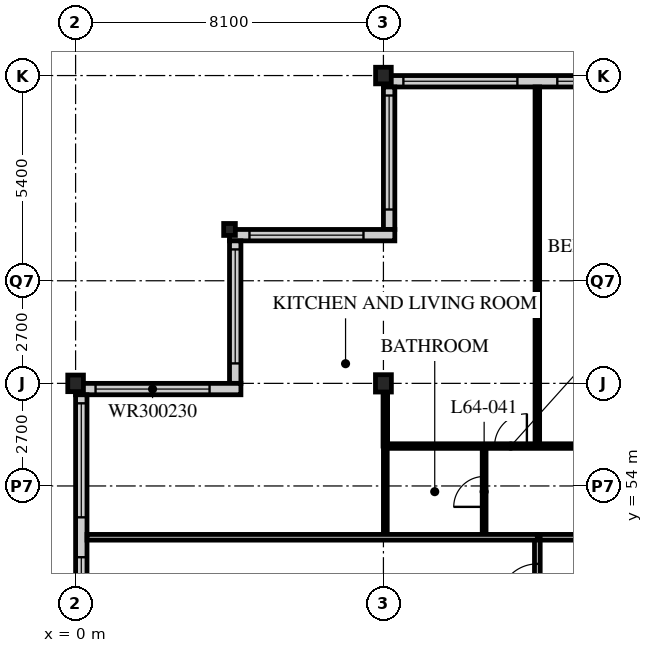
"""IFC4 building model, lengths in metres.
Left out: names, types, materials, properties, quantities, classifications, styles, units other than length and angle.
Written with IfcOpenShell. Run it as: python <this file> out.ifc"""

import sys

from ifc_helpers import new_model, si_unit, direction, frame, frame_2d, origin, origin_2d, place, context, subcontext, project, spatial, rectangle, i_section, extrude, element, fill, save


model = new_model("IFC4")
c1 = context("Model", 3, precision=1e-05, world=origin(), true_north=direction((0.0, 1.0)))
c2 = subcontext(c1, "Body", "Model", "MODEL_VIEW")
j1 = project(units=[si_unit("LENGTHUNIT", "METRE"), si_unit("PLANEANGLEUNIT", "RADIAN")], contexts=[c1])
p1 = place(None, origin())
s1 = spatial("IfcSite", under=j1, at=p1, CompositionType="ELEMENT")
p2 = place(p1, origin())
s2 = spatial("IfcBuilding", under=s1, at=p2, CompositionType="ELEMENT")
p3 = place(p2, frame((0.0, 0.0, 250.2)))
s3 = spatial("IfcBuildingStorey", under=s2, at=p3, CompositionType="ELEMENT", Elevation=250.2)
p4 = place(p3, frame((0.0, 56.7, 0.0), z_axis=(0.0, 0.0, 1.0), x_axis=(1.0, 0.0, 0.0)))
e1 = element("IfcColumn", 1, at=p4, inside=s3, PredefinedType="COLUMN", context=c2, shape_type="SweptSolid", body=[
    extrude(i_section(OverallWidth=0.412, OverallDepth=0.437, WebThickness=0.036, FlangeThickness=0.058, FilletRadius=0.015, at=origin_2d()), origin(), (0.0, 0.0, 1.0), 3.9),
])
p5 = place(p3, frame((4.05, 60.75, 0.0), z_axis=(0.0, 0.0, 1.0), x_axis=(1.0, 0.0, 0.0)))
e2 = element("IfcColumn", 2, at=p5, inside=s3, PredefinedType="COLUMN", context=c2, shape_type="SweptSolid", body=[
    extrude(i_section(OverallWidth=0.307, OverallDepth=0.314, WebThickness=0.012, FlangeThickness=0.019, FilletRadius=0.015, at=origin_2d()), origin(), (0.0, 0.0, 1.0), 3.9),
])
p6 = place(p3, frame((8.1, 56.7, 0.0), z_axis=(0.0, 0.0, 1.0), x_axis=(1.0, 0.0, 0.0)))
e3 = element("IfcColumn", 3, at=p6, inside=s3, PredefinedType="COLUMN", context=c2, shape_type="SweptSolid", body=[
    extrude(i_section(OverallWidth=0.418, OverallDepth=0.456, WebThickness=0.042, FlangeThickness=0.067, FilletRadius=0.015, at=origin_2d()), origin(), (0.0, 0.0, 1.0), 3.9),
])
p7 = place(p3, frame((8.1, 64.8, 0.0), z_axis=(0.0, 0.0, 1.0), x_axis=(1.0, 0.0, 0.0)))
e4 = element("IfcColumn", 4, at=p7, inside=s3, PredefinedType="COLUMN", context=c2, shape_type="SweptSolid", body=[
    extrude(i_section(OverallWidth=0.412, OverallDepth=0.437, WebThickness=0.036, FlangeThickness=0.058, FilletRadius=0.015, at=origin_2d()), origin(), (0.0, 0.0, 1.0), 3.9),
])
p8 = place(p3, frame((48.3, 64.65, 0.0), z_axis=(0.0, 0.0, 1.0), x_axis=(-1.0, 0.0, 0.0)))
e5 = element("IfcWall", 5, at=p8, inside=s3, PredefinedType="SOLIDWALL", context=c2, shape_type="SweptSolid", body=[
    extrude(rectangle(XDim=40.2, YDim=0.3, at=frame_2d((20.1, 0.0))), origin(), (0.0, 0.0, 1.0), 3.69),
])
p9 = place(p8, frame((0.225, 0.0, 0.6)))
e6 = element("IfcOpeningElement", 6, at=p9, cuts=e5, PredefinedType="OPENING", context=c2, shape_type="SweptSolid", body=[
    extrude(rectangle(XDim=3.0, YDim=2.4, at=frame_2d((1.5, 1.2))), frame((0.0, 0.16, 0.0), z_axis=(0.0, -1.0, 0.0), x_axis=(1.0, 0.0, 0.0)), (0.0, 0.0, 1.0), 0.32),
])
p10 = place(p8, frame((4.275, 0.0, 0.6)))
e7 = element("IfcOpeningElement", 7, at=p10, cuts=e5, PredefinedType="OPENING", context=c2, shape_type="SweptSolid", body=[
    extrude(rectangle(XDim=3.0, YDim=2.4, at=frame_2d((1.5, 1.2))), frame((0.0, 0.16, 0.0), z_axis=(0.0, -1.0, 0.0), x_axis=(1.0, 0.0, 0.0)), (0.0, 0.0, 1.0), 0.32),
])
p11 = place(p8, frame((8.325, 0.0, 0.6)))
e8 = element("IfcOpeningElement", 8, at=p11, cuts=e5, PredefinedType="OPENING", context=c2, shape_type="SweptSolid", body=[
    extrude(rectangle(XDim=3.0, YDim=2.4, at=frame_2d((1.5, 1.2))), frame((0.0, 0.16, 0.0), z_axis=(0.0, -1.0, 0.0), x_axis=(1.0, 0.0, 0.0)), (0.0, 0.0, 1.0), 0.32),
])
p12 = place(p8, frame((12.375, 0.0, 0.6)))
e9 = element("IfcOpeningElement", 9, at=p12, cuts=e5, PredefinedType="OPENING", context=c2, shape_type="SweptSolid", body=[
    extrude(rectangle(XDim=3.0, YDim=2.4, at=frame_2d((1.5, 1.2))), frame((0.0, 0.16, 0.0), z_axis=(0.0, -1.0, 0.0), x_axis=(1.0, 0.0, 0.0)), (0.0, 0.0, 1.0), 0.32),
])
p13 = place(p8, frame((16.425, 0.0, 0.6)))
e10 = element("IfcOpeningElement", 10, at=p13, cuts=e5, PredefinedType="OPENING", context=c2, shape_type="SweptSolid", body=[
    extrude(rectangle(XDim=3.0, YDim=2.4, at=frame_2d((1.5, 1.2))), frame((0.0, 0.16, 0.0), z_axis=(0.0, -1.0, 0.0), x_axis=(1.0, 0.0, 0.0)), (0.0, 0.0, 1.0), 0.32),
])
p14 = place(p8, frame((20.475, 0.0, 0.6)))
e11 = element("IfcOpeningElement", 11, at=p14, cuts=e5, PredefinedType="OPENING", context=c2, shape_type="SweptSolid", body=[
    extrude(rectangle(XDim=3.0, YDim=2.4, at=frame_2d((1.5, 1.2))), frame((0.0, 0.16, 0.0), z_axis=(0.0, -1.0, 0.0), x_axis=(1.0, 0.0, 0.0)), (0.0, 0.0, 1.0), 0.32),
])
p15 = place(p8, frame((24.525, 0.0, 0.6)))
e12 = element("IfcOpeningElement", 12, at=p15, cuts=e5, PredefinedType="OPENING", context=c2, shape_type="SweptSolid", body=[
    extrude(rectangle(XDim=3.0, YDim=2.4, at=frame_2d((1.5, 1.2))), frame((0.0, 0.16, 0.0), z_axis=(0.0, -1.0, 0.0), x_axis=(1.0, 0.0, 0.0)), (0.0, 0.0, 1.0), 0.32),
])
p16 = place(p8, frame((28.575, 0.0, 0.6)))
e13 = element("IfcOpeningElement", 13, at=p16, cuts=e5, PredefinedType="OPENING", context=c2, shape_type="SweptSolid", body=[
    extrude(rectangle(XDim=3.0, YDim=2.4, at=frame_2d((1.5, 1.2))), frame((0.0, 0.16, 0.0), z_axis=(0.0, -1.0, 0.0), x_axis=(1.0, 0.0, 0.0)), (0.0, 0.0, 1.0), 0.32),
])
p17 = place(p8, frame((32.625, 0.0, 0.6)))
e14 = element("IfcOpeningElement", 14, at=p17, cuts=e5, PredefinedType="OPENING", context=c2, shape_type="SweptSolid", body=[
    extrude(rectangle(XDim=3.0, YDim=2.4, at=frame_2d((1.5, 1.2))), frame((0.0, 0.16, 0.0), z_axis=(0.0, -1.0, 0.0), x_axis=(1.0, 0.0, 0.0)), (0.0, 0.0, 1.0), 0.32),
])
p18 = place(p8, frame((36.675, 0.0, 0.6)))
e15 = element("IfcOpeningElement", 15, at=p18, cuts=e5, PredefinedType="OPENING", context=c2, shape_type="SweptSolid", body=[
    extrude(rectangle(XDim=3.0, YDim=2.4, at=frame_2d((1.5, 1.2))), frame((0.0, 0.16, 0.0), z_axis=(0.0, -1.0, 0.0), x_axis=(1.0, 0.0, 0.0)), (0.0, 0.0, 1.0), 0.32),
])
p19 = place(p3, frame((8.25, 64.5, 0.0), z_axis=(0.0, 0.0, 1.0), x_axis=(0.0, -1.0, 0.0)))
e16 = element("IfcWall", 16, at=p19, inside=s3, PredefinedType="SOLIDWALL", context=c2, shape_type="SweptSolid", body=[
    extrude(rectangle(XDim=3.75, YDim=0.3, at=frame_2d((1.875, 0.0))), origin(), (0.0, 0.0, 1.0), 3.69),
])
p20 = place(p19, frame((0.225, 0.0, 0.6)))
e17 = element("IfcOpeningElement", 17, at=p20, cuts=e16, PredefinedType="OPENING", context=c2, shape_type="SweptSolid", body=[
    extrude(rectangle(XDim=3.0, YDim=2.3, at=frame_2d((1.5, 1.15))), frame((0.0, 0.16, 0.0), z_axis=(0.0, -1.0, 0.0), x_axis=(1.0, 0.0, 0.0)), (0.0, 0.0, 1.0), 0.32),
])
p21 = place(p3, frame((8.4, 60.6, 0.0), z_axis=(0.0, 0.0, 1.0), x_axis=(-1.0, 0.0, 0.0)))
e18 = element("IfcWall", 18, at=p21, inside=s3, PredefinedType="SOLIDWALL", context=c2, shape_type="SweptSolid", body=[
    extrude(rectangle(XDim=4.35, YDim=0.3, at=frame_2d((2.175, 0.0))), origin(), (0.0, 0.0, 1.0), 3.69),
])
p22 = place(p21, frame((0.825, 0.0, 0.6)))
e19 = element("IfcOpeningElement", 19, at=p22, cuts=e18, PredefinedType="OPENING", context=c2, shape_type="SweptSolid", body=[
    extrude(rectangle(XDim=3.0, YDim=2.3, at=frame_2d((1.5, 1.15))), frame((0.0, 0.16, 0.0), z_axis=(0.0, -1.0, 0.0), x_axis=(1.0, 0.0, 0.0)), (0.0, 0.0, 1.0), 0.32),
])
p23 = place(p3, frame((4.2, 60.45, 0.0), z_axis=(0.0, 0.0, 1.0), x_axis=(0.0, -1.0, 0.0)))
e20 = element("IfcWall", 20, at=p23, inside=s3, PredefinedType="SOLIDWALL", context=c2, shape_type="SweptSolid", body=[
    extrude(rectangle(XDim=3.75, YDim=0.3, at=frame_2d((1.875, 0.0))), origin(), (0.0, 0.0, 1.0), 3.69),
])
p24 = place(p23, frame((0.225, 0.0, 0.6)))
e21 = element("IfcOpeningElement", 21, at=p24, cuts=e20, PredefinedType="OPENING", context=c2, shape_type="SweptSolid", body=[
    extrude(rectangle(XDim=3.0, YDim=2.3, at=frame_2d((1.5, 1.15))), frame((0.0, 0.16, 0.0), z_axis=(0.0, -1.0, 0.0), x_axis=(1.0, 0.0, 0.0)), (0.0, 0.0, 1.0), 0.32),
])
p25 = place(p3, frame((4.35, 56.55, 0.0), z_axis=(0.0, 0.0, 1.0), x_axis=(-1.0, 0.0, 0.0)))
e22 = element("IfcWall", 22, at=p25, inside=s3, PredefinedType="SOLIDWALL", context=c2, shape_type="SweptSolid", body=[
    extrude(rectangle(XDim=4.35, YDim=0.3, at=frame_2d((2.175, 0.0))), origin(), (0.0, 0.0, 1.0), 3.69),
])
p26 = place(p25, frame((0.825, 0.0, 0.6)))
e23 = element("IfcOpeningElement", 23, at=p26, cuts=e22, PredefinedType="OPENING", context=c2, shape_type="SweptSolid", body=[
    extrude(rectangle(XDim=3.0, YDim=2.3, at=frame_2d((1.5, 1.15))), frame((0.0, 0.16, 0.0), z_axis=(0.0, -1.0, 0.0), x_axis=(1.0, 0.0, 0.0)), (0.0, 0.0, 1.0), 0.32),
])
p27 = place(p3, frame((0.15, 56.4, 0.0), z_axis=(0.0, 0.0, 1.0), x_axis=(0.0, -1.0, 0.0)))
e24 = element("IfcWall", 24, at=p27, inside=s3, PredefinedType="SOLIDWALL", context=c2, shape_type="SweptSolid", body=[
    extrude(rectangle(XDim=32.1, YDim=0.3, at=frame_2d((16.05, 0.0))), origin(), (0.0, 0.0, 1.0), 3.69),
])
p28 = place(p27, frame((0.225, 0.0, 0.6)))
e25 = element("IfcOpeningElement", 25, at=p28, cuts=e24, PredefinedType="OPENING", context=c2, shape_type="SweptSolid", body=[
    extrude(rectangle(XDim=3.0, YDim=2.4, at=frame_2d((1.5, 1.2))), frame((0.0, 0.16, 0.0), z_axis=(0.0, -1.0, 0.0), x_axis=(1.0, 0.0, 0.0)), (0.0, 0.0, 1.0), 0.32),
])
p29 = place(p27, frame((4.275, 0.0, 0.6)))
e26 = element("IfcOpeningElement", 26, at=p29, cuts=e24, PredefinedType="OPENING", context=c2, shape_type="SweptSolid", body=[
    extrude(rectangle(XDim=3.0, YDim=2.4, at=frame_2d((1.5, 1.2))), frame((0.0, 0.16, 0.0), z_axis=(0.0, -1.0, 0.0), x_axis=(1.0, 0.0, 0.0)), (0.0, 0.0, 1.0), 0.32),
])
p30 = place(p27, frame((8.325, 0.0, 0.6)))
e27 = element("IfcOpeningElement", 27, at=p30, cuts=e24, PredefinedType="OPENING", context=c2, shape_type="SweptSolid", body=[
    extrude(rectangle(XDim=3.0, YDim=2.4, at=frame_2d((1.5, 1.2))), frame((0.0, 0.16, 0.0), z_axis=(0.0, -1.0, 0.0), x_axis=(1.0, 0.0, 0.0)), (0.0, 0.0, 1.0), 0.32),
])
p31 = place(p27, frame((12.375, 0.0, 0.6)))
e28 = element("IfcOpeningElement", 28, at=p31, cuts=e24, PredefinedType="OPENING", context=c2, shape_type="SweptSolid", body=[
    extrude(rectangle(XDim=3.0, YDim=2.4, at=frame_2d((1.5, 1.2))), frame((0.0, 0.16, 0.0), z_axis=(0.0, -1.0, 0.0), x_axis=(1.0, 0.0, 0.0)), (0.0, 0.0, 1.0), 0.32),
])
p32 = place(p27, frame((16.425, 0.0, 0.6)))
e29 = element("IfcOpeningElement", 29, at=p32, cuts=e24, PredefinedType="OPENING", context=c2, shape_type="SweptSolid", body=[
    extrude(rectangle(XDim=3.0, YDim=2.4, at=frame_2d((1.5, 1.2))), frame((0.0, 0.16, 0.0), z_axis=(0.0, -1.0, 0.0), x_axis=(1.0, 0.0, 0.0)), (0.0, 0.0, 1.0), 0.32),
])
p33 = place(p27, frame((20.475, 0.0, 0.6)))
e30 = element("IfcOpeningElement", 30, at=p33, cuts=e24, PredefinedType="OPENING", context=c2, shape_type="SweptSolid", body=[
    extrude(rectangle(XDim=3.0, YDim=2.4, at=frame_2d((1.5, 1.2))), frame((0.0, 0.16, 0.0), z_axis=(0.0, -1.0, 0.0), x_axis=(1.0, 0.0, 0.0)), (0.0, 0.0, 1.0), 0.32),
])
p34 = place(p27, frame((24.525, 0.0, 0.6)))
e31 = element("IfcOpeningElement", 31, at=p34, cuts=e24, PredefinedType="OPENING", context=c2, shape_type="SweptSolid", body=[
    extrude(rectangle(XDim=3.0, YDim=2.4, at=frame_2d((1.5, 1.2))), frame((0.0, 0.16, 0.0), z_axis=(0.0, -1.0, 0.0), x_axis=(1.0, 0.0, 0.0)), (0.0, 0.0, 1.0), 0.32),
])
p35 = place(p27, frame((28.575, 0.0, 0.6)))
e32 = element("IfcOpeningElement", 32, at=p35, cuts=e24, PredefinedType="OPENING", context=c2, shape_type="SweptSolid", body=[
    extrude(rectangle(XDim=3.0, YDim=2.4, at=frame_2d((1.5, 1.2))), frame((0.0, 0.16, 0.0), z_axis=(0.0, -1.0, 0.0), x_axis=(1.0, 0.0, 0.0)), (0.0, 0.0, 1.0), 0.32),
])
p36 = place(p3, frame((12.15, 52.65, 0.0), z_axis=(0.0, 0.0, 1.0), x_axis=(1.0, 0.0, 0.0)))
e33 = element("IfcWall", 33, at=p36, inside=s3, PredefinedType="PARTITIONING", context=c2, shape_type="SweptSolid", body=[
    extrude(rectangle(XDim=24.3, YDim=0.15, at=frame_2d((12.15, 0.0))), origin(), (0.0, 0.0, 1.0), 3.69),
])
p37 = place(p36, frame((4.45, 0.0, 0.0)))
e34 = element("IfcOpeningElement", 34, at=p37, cuts=e33, PredefinedType="OPENING", context=c2, shape_type="SweptSolid", body=[
    extrude(rectangle(XDim=1.0, YDim=2.1, at=frame_2d((0.5, 1.05))), frame((0.0, 0.085, 0.0), z_axis=(0.0, -1.0, 0.0), x_axis=(1.0, 0.0, 0.0)), (0.0, 0.0, 1.0), 0.17),
])
p38 = place(p36, frame((1.525, 0.0, 0.0)))
e35 = element("IfcOpeningElement", 35, at=p38, cuts=e33, PredefinedType="OPENING", context=c2, shape_type="SweptSolid", body=[
    extrude(rectangle(XDim=1.0, YDim=2.1, at=frame_2d((0.5, 1.05))), frame((0.0, 0.085, 0.0), z_axis=(0.0, -1.0, 0.0), x_axis=(1.0, 0.0, 0.0)), (0.0, 0.0, 1.0), 0.17),
])
p39 = place(p3, frame((12.15, 22.5, 0.0), z_axis=(0.0, 0.0, 1.0), x_axis=(0.0, 1.0, 0.0)))
e36 = element("IfcWall", 36, at=p39, inside=s3, PredefinedType="PARTITIONING", context=c2, shape_type="SweptSolid", body=[
    extrude(rectangle(XDim=30.15, YDim=0.15, at=frame_2d((15.075, 0.0))), origin(), (0.0, 0.0, 1.0), 3.69),
])
p40 = place(p39, frame((0.4, 0.0, 0.0)))
e37 = element("IfcOpeningElement", 37, at=p40, cuts=e36, PredefinedType="OPENING", context=c2, shape_type="SweptSolid", body=[
    extrude(rectangle(XDim=1.0, YDim=2.1, at=frame_2d((0.5, 1.05))), frame((0.0, 0.085, 0.0), z_axis=(0.0, -1.0, 0.0), x_axis=(1.0, 0.0, 0.0)), (0.0, 0.0, 1.0), 0.17),
])
p41 = place(p39, frame((24.4, 0.0, 0.0)))
e38 = element("IfcOpeningElement", 38, at=p41, cuts=e36, PredefinedType="OPENING", context=c2, shape_type="SweptSolid", body=[
    extrude(rectangle(XDim=1.0, YDim=2.1, at=frame_2d((0.5, 1.05))), frame((0.0, 0.085, 0.0), z_axis=(0.0, -1.0, 0.0), x_axis=(1.0, 0.0, 0.0)), (0.0, 0.0, 1.0), 0.17),
])
p42 = place(p39, frame((28.45, 0.0, 0.0)))
e39 = element("IfcOpeningElement", 39, at=p42, cuts=e36, PredefinedType="OPENING", context=c2, shape_type="SweptSolid", body=[
    extrude(rectangle(XDim=1.0, YDim=2.1, at=frame_2d((0.5, 1.05))), frame((0.0, 0.085, 0.0), z_axis=(0.0, -1.0, 0.0), x_axis=(1.0, 0.0, 0.0)), (0.0, 0.0, 1.0), 0.17),
])
p43 = place(p3, frame((10.75, 52.65, 0.0), z_axis=(0.0, 0.0, 1.0), x_axis=(0.0, 1.0, 0.0)))
e40 = element("IfcWall", 40, at=p43, inside=s3, PredefinedType="PARTITIONING", context=c2, shape_type="SweptSolid", body=[
    extrude(rectangle(XDim=2.4, YDim=0.1, at=frame_2d((1.2, 0.0))), origin(), (0.0, 0.0, 1.0), 3.69),
])
p44 = place(p43, frame((0.8, 0.0, 0.0)))
e41 = element("IfcOpeningElement", 41, at=p44, cuts=e40, PredefinedType="OPENING", context=c2, shape_type="SweptSolid", body=[
    extrude(rectangle(XDim=0.8, YDim=2.1, at=frame_2d((0.4, 1.05))), frame((0.0, 0.06, 0.0), z_axis=(0.0, -1.0, 0.0), x_axis=(1.0, 0.0, 0.0)), (0.0, 0.0, 1.0), 0.12),
])
p45 = place(p3, frame((8.15, 52.65, 0.0), z_axis=(0.0, 0.0, 1.0), x_axis=(0.0, 1.0, 0.0)))
e42 = element("IfcWall", 42, at=p45, inside=s3, PredefinedType="PARTITIONING", context=c2, shape_type="SweptSolid", body=[
    extrude(rectangle(XDim=2.4, YDim=0.1, at=frame_2d((1.2, 0.0))), origin(), (0.0, 0.0, 1.0), 3.078),
])
p46 = place(p3, frame((8.15, 55.05, 0.0), z_axis=(0.0, 0.0, 1.0), x_axis=(1.0, 0.0, 0.0)))
e43 = element("IfcWall", 43, at=p46, inside=s3, PredefinedType="PARTITIONING", context=c2, shape_type="SweptSolid", body=[
    extrude(rectangle(XDim=28.3, YDim=0.12, at=frame_2d((14.15, 0.0))), origin(), (0.0, 0.0, 1.0), 3.69),
])
p47 = place(p46, frame((9.025, 0.0, 0.0)))
e44 = element("IfcOpeningElement", 44, at=p47, cuts=e43, PredefinedType="OPENING", context=c2, shape_type="SweptSolid", body=[
    extrude(rectangle(XDim=0.85, YDim=2.1, at=frame_2d((0.425, 1.05))), frame((0.0, 0.07, 0.0), z_axis=(0.0, -1.0, 0.0), x_axis=(1.0, 0.0, 0.0)), (0.0, 0.0, 1.0), 0.14),
])
p48 = place(p46, frame((16.475, 0.0, 0.0)))
e45 = element("IfcOpeningElement", 45, at=p48, cuts=e43, PredefinedType="OPENING", context=c2, shape_type="SweptSolid", body=[
    extrude(rectangle(XDim=0.85, YDim=2.1, at=frame_2d((0.425, 1.05))), frame((0.0, 0.07, 0.0), z_axis=(0.0, -1.0, 0.0), x_axis=(1.0, 0.0, 0.0)), (0.0, 0.0, 1.0), 0.14),
])
p49 = place(p46, frame((20.525, 0.0, 0.0)))
e46 = element("IfcOpeningElement", 46, at=p49, cuts=e43, PredefinedType="OPENING", context=c2, shape_type="SweptSolid", body=[
    extrude(rectangle(XDim=0.85, YDim=2.1, at=frame_2d((0.425, 1.05))), frame((0.0, 0.07, 0.0), z_axis=(0.0, -1.0, 0.0), x_axis=(1.0, 0.0, 0.0)), (0.0, 0.0, 1.0), 0.14),
])
p50 = place(p46, frame((24.575, 0.0, 0.0)))
e47 = element("IfcOpeningElement", 47, at=p50, cuts=e43, PredefinedType="OPENING", context=c2, shape_type="SweptSolid", body=[
    extrude(rectangle(XDim=0.85, YDim=2.1, at=frame_2d((0.425, 1.05))), frame((0.0, 0.07, 0.0), z_axis=(0.0, -1.0, 0.0), x_axis=(1.0, 0.0, 0.0)), (0.0, 0.0, 1.0), 0.14),
])
p51 = place(p46, frame((6.725, 0.0, 0.0)))
e48 = element("IfcOpeningElement", 48, at=p51, cuts=e43, PredefinedType="OPENING", context=c2, shape_type="SweptSolid", body=[
    extrude(rectangle(XDim=0.85, YDim=2.1, at=frame_2d((0.425, 1.05))), frame((0.0, 0.07, 0.0), z_axis=(0.0, -1.0, 0.0), x_axis=(1.0, 0.0, 0.0)), (0.0, 0.0, 1.0), 0.14),
])
p52 = place(p46, frame((2.875, 0.0, 0.0)))
e49 = element("IfcOpeningElement", 49, at=p52, cuts=e43, PredefinedType="OPENING", context=c2, shape_type="SweptSolid", body=[
    extrude(rectangle(XDim=0.85, YDim=2.1, at=frame_2d((0.425, 1.05))), frame((0.0, 0.07, 0.0), z_axis=(0.0, -1.0, 0.0), x_axis=(1.0, 0.0, 0.0)), (0.0, 0.0, 1.0), 0.14),
])
p53 = place(p3, frame((12.15, 55.05, 0.0), z_axis=(0.0, 0.0, 1.0), x_axis=(0.0, 1.0, 0.0)))
e50 = element("IfcWall", 50, at=p53, inside=s3, PredefinedType="PARTITIONING", context=c2, shape_type="SweptSolid", body=[
    extrude(rectangle(XDim=9.45, YDim=0.12, at=frame_2d((4.725, 0.0))), origin(), (0.0, 0.0, 1.0), 3.69),
])
p54 = place(p3, frame((0.3, 52.65, 0.0), z_axis=(0.0, 0.0, 1.0), x_axis=(1.0, 0.0, 0.0)))
e51 = element("IfcWall", 51, at=p54, inside=s3, PredefinedType="PARTITIONING", context=c2, shape_type="SweptSolid", body=[
    extrude(rectangle(XDim=11.85, YDim=0.15, at=frame_2d((5.925, 0.0))), origin(), (0.0, 0.0, 1.0), 3.69),
])
p55 = place(p3, frame((8.15, 55.05, 0.0), z_axis=(0.0, 0.0, 1.0), x_axis=(0.0, 1.0, 0.0)))
e52 = element("IfcWall", 52, at=p55, inside=s3, PredefinedType="PARTITIONING", context=c2, shape_type="SweptSolid", body=[
    extrude(rectangle(XDim=1.447, YDim=0.12, at=frame_2d((0.724, 0.0))), origin(), (0.0, 0.0, 1.0), 3.078),
])
p56 = place(p17, origin())
e53 = element("IfcWindow", 53, at=p56, inside=s3, PartitioningType="SINGLE_PANEL", PredefinedType="WINDOW", context=c2, shape_type="SweptSolid", body=[
    extrude(rectangle(XDim=3.0, YDim=2.4, at=frame_2d((1.5, 1.2))), frame((0.0, 0.03, 0.0), z_axis=(0.0, -1.0, 0.0), x_axis=(1.0, 0.0, 0.0)), (0.0, 0.0, 1.0), 0.06),
])
fill(e14, e53)
p57 = place(p18, origin())
e54 = element("IfcWindow", 54, at=p57, inside=s3, PartitioningType="SINGLE_PANEL", PredefinedType="WINDOW", context=c2, shape_type="SweptSolid", body=[
    extrude(rectangle(XDim=3.0, YDim=2.4, at=frame_2d((1.5, 1.2))), frame((0.0, 0.03, 0.0), z_axis=(0.0, -1.0, 0.0), x_axis=(1.0, 0.0, 0.0)), (0.0, 0.0, 1.0), 0.06),
])
fill(e15, e54)
p58 = place(p20, origin())
e55 = element("IfcWindow", 55, at=p58, inside=s3, PartitioningType="SINGLE_PANEL", PredefinedType="WINDOW", context=c2, shape_type="SweptSolid", body=[
    extrude(rectangle(XDim=3.0, YDim=2.3, at=frame_2d((1.5, 1.15))), frame((0.0, 0.03, 0.0), z_axis=(0.0, -1.0, 0.0), x_axis=(1.0, 0.0, 0.0)), (0.0, 0.0, 1.0), 0.06),
])
fill(e17, e55)
p59 = place(p22, origin())
e56 = element("IfcWindow", 56, at=p59, inside=s3, PartitioningType="SINGLE_PANEL", PredefinedType="WINDOW", context=c2, shape_type="SweptSolid", body=[
    extrude(rectangle(XDim=3.0, YDim=2.3, at=frame_2d((1.5, 1.15))), frame((0.0, 0.03, 0.0), z_axis=(0.0, -1.0, 0.0), x_axis=(1.0, 0.0, 0.0)), (0.0, 0.0, 1.0), 0.06),
])
fill(e19, e56)
p60 = place(p24, origin())
e57 = element("IfcWindow", 57, at=p60, inside=s3, PartitioningType="SINGLE_PANEL", PredefinedType="WINDOW", context=c2, shape_type="SweptSolid", body=[
    extrude(rectangle(XDim=3.0, YDim=2.3, at=frame_2d((1.5, 1.15))), frame((0.0, 0.03, 0.0), z_axis=(0.0, -1.0, 0.0), x_axis=(1.0, 0.0, 0.0)), (0.0, 0.0, 1.0), 0.06),
])
fill(e21, e57)
p61 = place(p26, origin())
e58 = element("IfcWindow", 58, at=p61, inside=s3, PartitioningType="SINGLE_PANEL", PredefinedType="WINDOW", context=c2, shape_type="SweptSolid", body=[
    extrude(rectangle(XDim=3.0, YDim=2.3, at=frame_2d((1.5, 1.15))), frame((0.0, 0.03, 0.0), z_axis=(0.0, -1.0, 0.0), x_axis=(1.0, 0.0, 0.0)), (0.0, 0.0, 1.0), 0.06),
])
fill(e23, e58)
p62 = place(p28, origin())
e59 = element("IfcWindow", 59, at=p62, inside=s3, PartitioningType="SINGLE_PANEL", PredefinedType="WINDOW", context=c2, shape_type="SweptSolid", body=[
    extrude(rectangle(XDim=3.0, YDim=2.4, at=frame_2d((1.5, 1.2))), frame((0.0, 0.03, 0.0), z_axis=(0.0, -1.0, 0.0), x_axis=(1.0, 0.0, 0.0)), (0.0, 0.0, 1.0), 0.06),
])
fill(e25, e59)
p63 = place(p29, origin())
e60 = element("IfcWindow", 60, at=p63, inside=s3, PartitioningType="SINGLE_PANEL", PredefinedType="WINDOW", context=c2, shape_type="SweptSolid", body=[
    extrude(rectangle(XDim=3.0, YDim=2.4, at=frame_2d((1.5, 1.2))), frame((0.0, 0.03, 0.0), z_axis=(0.0, -1.0, 0.0), x_axis=(1.0, 0.0, 0.0)), (0.0, 0.0, 1.0), 0.06),
])
fill(e26, e60)
p64 = place(p42, origin())
e61 = element("IfcDoor", 61, at=p64, inside=s3, OperationType="SINGLE_SWING_LEFT", PredefinedType="DOOR", context=c2, shape_type="SweptSolid", body=[
    extrude(rectangle(XDim=1.0, YDim=2.1, at=frame_2d((0.5, 1.05))), frame((0.0, 0.025, 0.0), z_axis=(0.0, -1.0, 0.0), x_axis=(1.0, 0.0, 0.0)), (0.0, 0.0, 1.0), 0.05),
])
fill(e39, e61)
p65 = place(p44, origin())
e62 = element("IfcDoor", 62, at=p65, inside=s3, OperationType="SINGLE_SWING_LEFT", PredefinedType="DOOR", context=c2, shape_type="SweptSolid", body=[
    extrude(rectangle(XDim=0.8, YDim=2.1, at=frame_2d((0.4, 1.05))), frame((0.0, 0.025, 0.0), z_axis=(0.0, -1.0, 0.0), x_axis=(1.0, 0.0, 0.0)), (0.0, 0.0, 1.0), 0.05),
])
fill(e41, e62)
p66 = place(p52, origin())
e63 = element("IfcDoor", 63, at=p66, inside=s3, OperationType="SINGLE_SWING_RIGHT", PredefinedType="DOOR", context=c2, shape_type="SweptSolid", body=[
    extrude(rectangle(XDim=0.85, YDim=2.1, at=frame_2d((0.425, 1.05))), frame((0.0, 0.025, 0.0), z_axis=(0.0, -1.0, 0.0), x_axis=(1.0, 0.0, 0.0)), (0.0, 0.0, 1.0), 0.05),
])
fill(e49, e63)
save(model, sys.argv[1])
